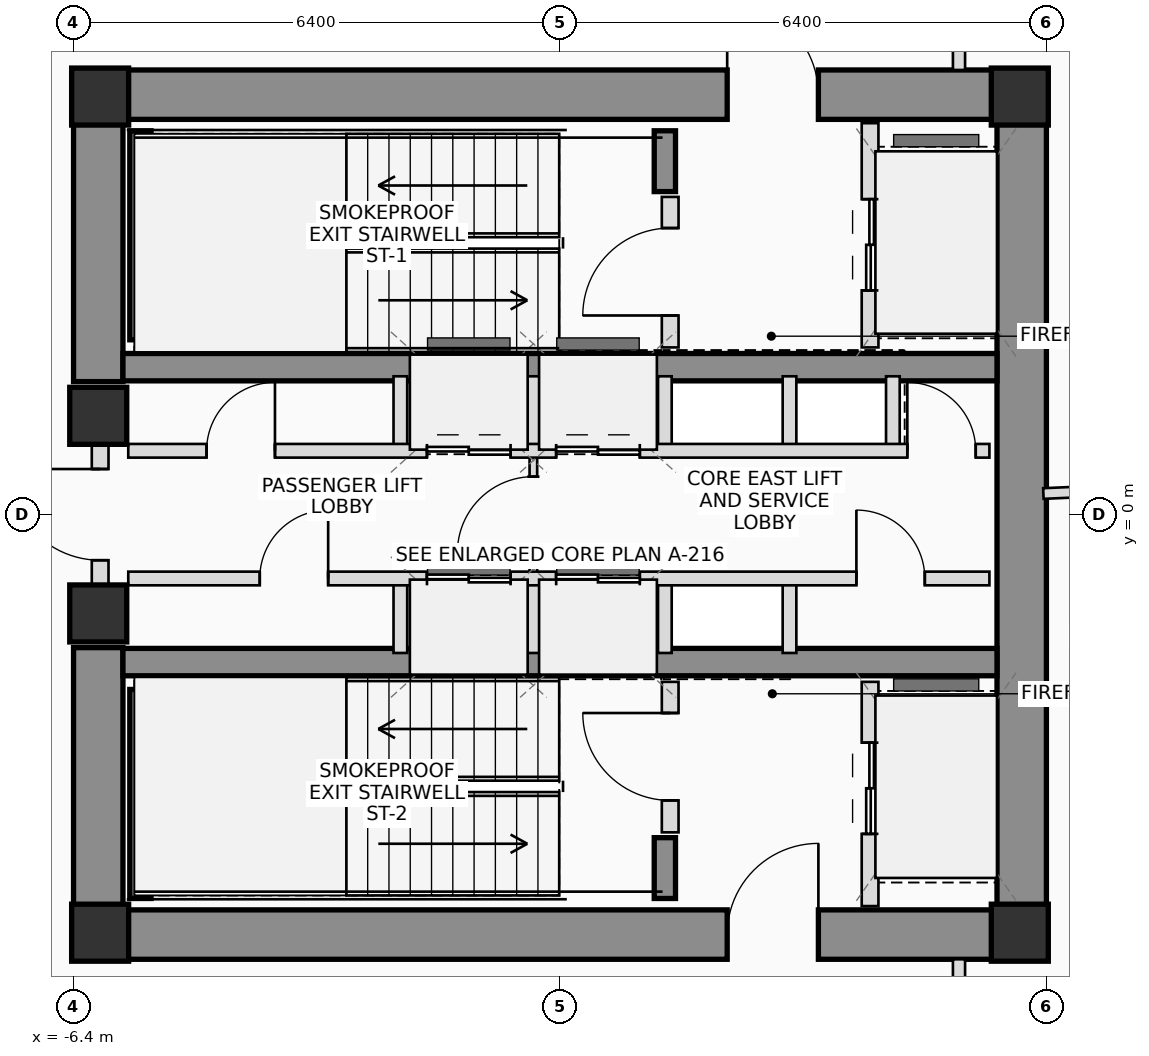
"""IFC4 building model, lengths in metres.
Left out: names, types, materials, properties, quantities, classifications, styles, units other than length and angle.
Written with IfcOpenShell. Run it as: python <this file> out.ifc"""

import sys

from ifc_helpers import new_model, si_unit, direction, frame, frame_2d, origin, origin_2d, place, context, subcontext, project, spatial, rectangle, extrude, source, transform, mapped, element, fill, save


model = new_model("IFC4")
c1 = context("Model", 3, precision=1e-05, world=origin(), true_north=direction((0.0, 1.0)))
c2 = subcontext(c1, "Body", "Model", "MODEL_VIEW")
j1 = project(units=[si_unit("LENGTHUNIT", "METRE"), si_unit("PLANEANGLEUNIT", "RADIAN")], contexts=[c1])
p1 = place(None, origin())
s1 = spatial("IfcSite", under=j1, at=p1, CompositionType="ELEMENT")
p2 = place(p1, origin())
s2 = spatial("IfcBuilding", under=s1, at=p2, CompositionType="ELEMENT")
p3 = place(p2, frame((0.0, 0.0, 179.45)))
s3 = spatial("IfcBuildingStorey", under=s2, at=p3, CompositionType="ELEMENT", Elevation=179.45)
m1 = source(origin(), c2, "Body", "SweptSolid", [
    extrude(rectangle(XDim=0.75, YDim=0.75, at=origin_2d()), origin(), (0.0, 0.0, 1.0), 3.45),
])
for number, where, z_axis, x_axis in (
    (1, (-6.05, -5.5, 0.0), (0.0, 0.0, 1.0), (1.0, 0.0, 0.0)),
    (2, (6.05, -5.5, 0.0), (0.0, 0.0, 1.0), (1.0, 0.0, 0.0)),
    (3, (6.05, 5.5, 0.0), (0.0, 0.0, 1.0), (1.0, 0.0, 0.0)),
    (4, (-6.05, 5.5, 0.0), (0.0, 0.0, 1.0), (1.0, 0.0, 0.0)),
):
    element("IfcColumn", number, at=place(p3, frame(where, z_axis=z_axis, x_axis=x_axis)), inside=s3, PredefinedType="COLUMN", context=c2, shape_type="MappedRepresentation", body=[
        mapped(m1, transform((0.0, 0.0, 0.0), scale=1.0)),
    ])
p4 = place(p3, frame((-6.4, 5.525, 0.0), z_axis=(0.0, 0.0, 1.0), x_axis=(1.0, 0.0, 0.0)))
e5 = element("IfcWall", 5, at=p4, inside=s3, PredefinedType="SHEAR", context=c2, shape_type="SweptSolid", body=[
    extrude(rectangle(XDim=12.8, YDim=0.65, at=frame_2d((6.4, 0.0))), origin(), (0.0, 0.0, 1.0), 3.45),
])
p5 = place(p4, frame((8.6, 0.0, 0.0)))
e6 = element("IfcOpeningElement", 6, at=p5, cuts=e5, PredefinedType="OPENING", context=c2, shape_type="SweptSolid", body=[
    extrude(rectangle(XDim=1.2, YDim=2.2, at=frame_2d((0.6, 1.1))), frame((0.0, 0.335, 0.0), z_axis=(0.0, -1.0, 0.0), x_axis=(1.0, 0.0, 0.0)), (0.0, 0.0, 1.0), 0.67),
])
p6 = place(p3, frame((-6.4, -5.525, 0.0), z_axis=(0.0, 0.0, 1.0), x_axis=(1.0, 0.0, 0.0)))
e7 = element("IfcWall", 7, at=p6, inside=s3, PredefinedType="SHEAR", context=c2, shape_type="SweptSolid", body=[
    extrude(rectangle(XDim=12.8, YDim=0.65, at=frame_2d((6.4, 0.0))), origin(), (0.0, 0.0, 1.0), 3.45),
])
p7 = place(p6, frame((8.6, 0.0, 0.0)))
e8 = element("IfcOpeningElement", 8, at=p7, cuts=e7, PredefinedType="OPENING", context=c2, shape_type="SweptSolid", body=[
    extrude(rectangle(XDim=1.2, YDim=2.2, at=frame_2d((0.6, 1.1))), frame((0.0, 0.335, 0.0), z_axis=(0.0, -1.0, 0.0), x_axis=(1.0, 0.0, 0.0)), (0.0, 0.0, 1.0), 0.67),
])
p8 = place(p3, frame((6.075, -5.2, 0.0), z_axis=(0.0, 0.0, 1.0), x_axis=(0.0, 1.0, 0.0)))
e9 = element("IfcWall", 9, at=p8, inside=s3, PredefinedType="SHEAR", context=c2, shape_type="SweptSolid", body=[
    extrude(rectangle(XDim=10.4, YDim=0.65, at=frame_2d((5.2, 0.0))), origin(), (0.0, 0.0, 1.0), 3.45),
])
for number, where, z_axis, x_axis in (
    (10, (-6.075, -5.2, 0.0), (0.0, 0.0, 1.0), (0.0, 1.0, 0.0)),
    (11, (-6.075, 1.75, 0.0), (0.0, 0.0, 1.0), (0.0, 1.0, 0.0)),
):
    element("IfcWall", number, at=place(p3, frame(where, z_axis=z_axis, x_axis=x_axis)), inside=s3, PredefinedType="SHEAR", context=c2, shape_type="SweptSolid", body=[
        extrude(rectangle(XDim=3.45, YDim=0.65, at=frame_2d((1.725, 0.0))), origin(), (0.0, 0.0, 1.0), 3.45),
    ])
for number, where, z_axis, x_axis in (
    (12, (-5.75, 1.94, 0.0), (0.0, 0.0, 1.0), (1.0, 0.0, 0.0)),
    (13, (-5.75, -1.94, 0.0), (0.0, 0.0, 1.0), (1.0, 0.0, 0.0)),
):
    element("IfcWall", number, at=place(p3, frame(where, z_axis=z_axis, x_axis=x_axis)), inside=s3, PredefinedType="SHEAR", context=c2, shape_type="SweptSolid", body=[
        extrude(rectangle(XDim=11.5, YDim=0.36, at=frame_2d((5.75, 0.0))), origin(), (0.0, 0.0, 1.0), 3.45),
    ])
p9 = place(p3, frame((-5.52, 2.3, 0.0), z_axis=(0.0, 0.0, 1.0), x_axis=(0.0, 1.0, 0.0)))
e14 = element("IfcWall", 14, at=p9, inside=s3, PredefinedType="SHEAR", context=c2, shape_type="SweptSolid", body=[
    extrude(rectangle(XDim=2.75, YDim=0.28, at=frame_2d((1.375, 0.0))), origin(), (0.0, 0.0, 1.0), 3.45),
])
p10 = place(p3, frame((1.38, 4.25, 0.0), z_axis=(0.0, 0.0, 1.0), x_axis=(0.0, 1.0, 0.0)))
e15 = element("IfcWall", 15, at=p10, inside=s3, PredefinedType="SHEAR", context=c2, shape_type="SweptSolid", body=[
    extrude(rectangle(XDim=0.8, YDim=0.28, at=frame_2d((0.4, 0.0))), origin(), (0.0, 0.0, 1.0), 3.45),
])
p11 = place(p3, frame((-5.52, -5.05, 0.0), z_axis=(0.0, 0.0, 1.0), x_axis=(0.0, 1.0, 0.0)))
e16 = element("IfcWall", 16, at=p11, inside=s3, PredefinedType="SHEAR", context=c2, shape_type="SweptSolid", body=[
    extrude(rectangle(XDim=2.75, YDim=0.28, at=frame_2d((1.375, 0.0))), origin(), (0.0, 0.0, 1.0), 3.45),
])
p12 = place(p3, frame((1.38, -5.05, 0.0), z_axis=(0.0, 0.0, 1.0), x_axis=(0.0, 1.0, 0.0)))
e17 = element("IfcWall", 17, at=p12, inside=s3, PredefinedType="SHEAR", context=c2, shape_type="SweptSolid", body=[
    extrude(rectangle(XDim=0.8, YDim=0.28, at=frame_2d((0.4, 0.0))), origin(), (0.0, 0.0, 1.0), 3.45),
])
for number, where, z_axis, x_axis in (
    (18, (-6.075, -1.3, 0.0), (0.0, 0.0, 1.0), (1.0, 0.0, 0.0)),
    (19, (-6.075, 1.3, 0.0), (0.0, 0.0, 1.0), (1.0, 0.0, 0.0)),
):
    element("IfcColumn", number, at=place(p3, frame(where, z_axis=z_axis, x_axis=x_axis)), inside=s3, PredefinedType="COLUMN", context=c2, shape_type="MappedRepresentation", body=[
        mapped(m1, transform((0.0, 0.0, 0.0), scale=1.0)),
    ])
p13 = place(p3, frame((-6.05, -0.95, 0.0), z_axis=(0.0, 0.0, 1.0), x_axis=(0.0, 1.0, 0.0)))
e20 = element("IfcWall", 20, at=p13, inside=s3, PredefinedType="PLUMBINGWALL", context=c2, shape_type="SweptSolid", body=[
    extrude(rectangle(XDim=1.9, YDim=0.22, at=frame_2d((0.95, 0.0))), origin(), (0.0, 0.0, 1.0), 2.23),
])
p14 = place(p13, frame((0.35, 0.0, 0.0)))
e21 = element("IfcOpeningElement", 21, at=p14, cuts=e20, PredefinedType="OPENING", context=c2, shape_type="SweptSolid", body=[
    extrude(rectangle(XDim=1.2, YDim=2.2, at=frame_2d((0.6, 1.1))), frame((0.0, 0.12, 0.0), z_axis=(0.0, -1.0, 0.0), x_axis=(1.0, 0.0, 0.0)), (0.0, 0.0, 1.0), 0.24),
])
p15 = place(p3, frame((1.45, 2.2, 0.0), z_axis=(0.0, 0.0, 1.0), x_axis=(0.0, 1.0, 0.0)))
e22 = element("IfcWall", 22, at=p15, inside=s3, PredefinedType="PLUMBINGWALL", context=c2, shape_type="SweptSolid", body=[
    extrude(rectangle(XDim=1.98, YDim=0.22, at=frame_2d((0.99, 0.0))), origin(), (0.0, 0.0, 1.0), 3.25),
])
p16 = place(p15, frame((0.42, 0.0, 0.0)))
e23 = element("IfcOpeningElement", 23, at=p16, cuts=e22, PredefinedType="OPENING", context=c2, shape_type="SweptSolid", body=[
    extrude(rectangle(XDim=1.15, YDim=2.15, at=frame_2d((0.575, 1.075))), frame((0.0, 0.12, 0.0), z_axis=(0.0, -1.0, 0.0), x_axis=(1.0, 0.0, 0.0)), (0.0, 0.0, 1.0), 0.24),
])
p17 = place(p3, frame((4.08, 2.2, 0.0), z_axis=(0.0, 0.0, 1.0), x_axis=(0.0, 1.0, 0.0)))
e24 = element("IfcWall", 24, at=p17, inside=s3, PredefinedType="PLUMBINGWALL", context=c2, shape_type="SweptSolid", body=[
    extrude(rectangle(XDim=2.95, YDim=0.22, at=frame_2d((1.475, 0.0))), origin(), (0.0, 0.0, 1.0), 3.25),
])
p18 = place(p17, frame((0.75, 0.0, 0.0)))
e25 = element("IfcOpeningElement", 25, at=p18, cuts=e24, PredefinedType="OPENING", context=c2, shape_type="SweptSolid", body=[
    extrude(rectangle(XDim=1.2, YDim=2.25, at=frame_2d((0.6, 1.125))), frame((0.0, 0.12, 0.0), z_axis=(0.0, -1.0, 0.0), x_axis=(1.0, 0.0, 0.0)), (0.0, 0.0, 1.0), 0.24),
])
p19 = place(p3, frame((1.45, -4.18, 0.0), z_axis=(0.0, 0.0, 1.0), x_axis=(0.0, 1.0, 0.0)))
e26 = element("IfcWall", 26, at=p19, inside=s3, PredefinedType="PLUMBINGWALL", context=c2, shape_type="SweptSolid", body=[
    extrude(rectangle(XDim=1.98, YDim=0.22, at=frame_2d((0.99, 0.0))), origin(), (0.0, 0.0, 1.0), 3.25),
])
p20 = place(p19, frame((0.42, 0.0, 0.0)))
e27 = element("IfcOpeningElement", 27, at=p20, cuts=e26, PredefinedType="OPENING", context=c2, shape_type="SweptSolid", body=[
    extrude(rectangle(XDim=1.15, YDim=2.15, at=frame_2d((0.575, 1.075))), frame((0.0, 0.12, 0.0), z_axis=(0.0, -1.0, 0.0), x_axis=(1.0, 0.0, 0.0)), (0.0, 0.0, 1.0), 0.24),
])
p21 = place(p3, frame((4.08, -5.15, 0.0), z_axis=(0.0, 0.0, 1.0), x_axis=(0.0, 1.0, 0.0)))
e28 = element("IfcWall", 28, at=p21, inside=s3, PredefinedType="PLUMBINGWALL", context=c2, shape_type="SweptSolid", body=[
    extrude(rectangle(XDim=2.95, YDim=0.22, at=frame_2d((1.475, 0.0))), origin(), (0.0, 0.0, 1.0), 3.25),
])
p22 = place(p21, frame((0.95, 0.0, 0.0)))
e29 = element("IfcOpeningElement", 29, at=p22, cuts=e28, PredefinedType="OPENING", context=c2, shape_type="SweptSolid", body=[
    extrude(rectangle(XDim=1.2, YDim=2.25, at=frame_2d((0.6, 1.125))), frame((0.0, 0.12, 0.0), z_axis=(0.0, -1.0, 0.0), x_axis=(1.0, 0.0, 0.0)), (0.0, 0.0, 1.0), 0.24),
])
p23 = place(p3, frame((-0.35, -0.84, 0.0), z_axis=(0.0, 0.0, 1.0), x_axis=(0.0, 1.0, 0.0)))
e30 = element("IfcWall", 30, at=p23, inside=s3, PredefinedType="PARTITIONING", context=c2, shape_type="SweptSolid", body=[
    extrude(rectangle(XDim=1.68, YDim=0.1, at=frame_2d((0.84, 0.0))), origin(), (0.0, 0.0, 1.0), 3.25),
])
p24 = place(p23, frame((0.34, 0.0, 0.0)))
e31 = element("IfcOpeningElement", 31, at=p24, cuts=e30, PredefinedType="OPENING", context=c2, shape_type="SweptSolid", body=[
    extrude(rectangle(XDim=1.0, YDim=2.25, at=frame_2d((0.5, 1.125))), frame((0.0, 0.06, 0.0), z_axis=(0.0, -1.0, 0.0), x_axis=(1.0, 0.0, 0.0)), (0.0, 0.0, 1.0), 0.12),
])
for number, where, z_axis, x_axis in (
    (32, (-2.1, 0.84, 0.0), (0.0, 0.0, 1.0), (0.0, 1.0, 0.0)),
    (33, (-2.1, -1.82, 0.0), (0.0, 0.0, 1.0), (0.0, 1.0, 0.0)),
    (34, (-0.35, 0.84, 0.0), (0.0, 0.0, 1.0), (0.0, 1.0, 0.0)),
    (35, (-0.35, -1.82, 0.0), (0.0, 0.0, 1.0), (0.0, 1.0, 0.0)),
    (36, (1.38, 0.84, 0.0), (0.0, 0.0, 1.0), (0.0, 1.0, 0.0)),
    (37, (1.38, -1.82, 0.0), (0.0, 0.0, 1.0), (0.0, 1.0, 0.0)),
    (38, (3.02, 0.84, 0.0), (0.0, 0.0, 1.0), (0.0, 1.0, 0.0)),
    (39, (4.38, 0.84, 0.0), (0.0, 0.0, 1.0), (0.0, 1.0, 0.0)),
    (40, (3.02, -1.82, 0.0), (0.0, 0.0, 1.0), (0.0, 1.0, 0.0)),
):
    element("IfcWall", number, at=place(p3, frame(where, z_axis=z_axis, x_axis=x_axis)), inside=s3, PredefinedType="PLUMBINGWALL", context=c2, shape_type="SweptSolid", body=[
        extrude(rectangle(XDim=0.98, YDim=0.18, at=frame_2d((0.49, 0.0))), origin(), (0.0, 0.0, 1.0), 3.25),
    ])
p25 = place(p3, frame((-5.68, 0.84, 0.0), z_axis=(0.0, 0.0, 1.0), x_axis=(1.0, 0.0, 0.0)))
e41 = element("IfcWall", 41, at=p25, inside=s3, PredefinedType="PLUMBINGWALL", context=c2, shape_type="SweptSolid", body=[
    extrude(rectangle(XDim=11.33, YDim=0.18, at=frame_2d((5.665, 0.0))), origin(), (0.0, 0.0, 1.0), 3.25),
])
p26 = place(p25, frame((1.03, 0.0, 0.0)))
e42 = element("IfcOpeningElement", 42, at=p26, cuts=e41, PredefinedType="OPENING", context=c2, shape_type="SweptSolid", body=[
    extrude(rectangle(XDim=0.9, YDim=2.05, at=frame_2d((0.45, 1.025))), frame((0.0, 0.1, 0.0), z_axis=(0.0, -1.0, 0.0), x_axis=(1.0, 0.0, 0.0)), (0.0, 0.0, 1.0), 0.2),
])
p27 = place(p25, frame((3.93, 0.0, 0.0)))
e43 = element("IfcOpeningElement", 43, at=p27, cuts=e41, PredefinedType="OPENING", context=c2, shape_type="SweptSolid", body=[
    extrude(rectangle(XDim=1.1, YDim=2.2, at=frame_2d((0.55, 1.1))), frame((0.0, 0.1, 0.0), z_axis=(0.0, -1.0, 0.0), x_axis=(1.0, 0.0, 0.0)), (0.0, 0.0, 1.0), 0.2),
])
p28 = place(p25, frame((5.63, 0.0, 0.0)))
e44 = element("IfcOpeningElement", 44, at=p28, cuts=e41, PredefinedType="OPENING", context=c2, shape_type="SweptSolid", body=[
    extrude(rectangle(XDim=1.1, YDim=2.2, at=frame_2d((0.55, 1.1))), frame((0.0, 0.1, 0.0), z_axis=(0.0, -1.0, 0.0), x_axis=(1.0, 0.0, 0.0)), (0.0, 0.0, 1.0), 0.2),
])
p29 = place(p25, frame((10.25, 0.0, 0.0)))
e45 = element("IfcOpeningElement", 45, at=p29, cuts=e41, PredefinedType="OPENING", context=c2, shape_type="SweptSolid", body=[
    extrude(rectangle(XDim=0.9, YDim=2.05, at=frame_2d((0.45, 1.025))), frame((0.0, 0.1, 0.0), z_axis=(0.0, -1.0, 0.0), x_axis=(1.0, 0.0, 0.0)), (0.0, 0.0, 1.0), 0.2),
])
p30 = place(p3, frame((-5.68, -0.84, 0.0), z_axis=(0.0, 0.0, 1.0), x_axis=(1.0, 0.0, 0.0)))
e46 = element("IfcWall", 46, at=p30, inside=s3, PredefinedType="PLUMBINGWALL", context=c2, shape_type="SweptSolid", body=[
    extrude(rectangle(XDim=11.33, YDim=0.18, at=frame_2d((5.665, 0.0))), origin(), (0.0, 0.0, 1.0), 3.25),
])
p31 = place(p30, frame((1.73, 0.0, 0.0)))
e47 = element("IfcOpeningElement", 47, at=p31, cuts=e46, PredefinedType="OPENING", context=c2, shape_type="SweptSolid", body=[
    extrude(rectangle(XDim=0.9, YDim=2.05, at=frame_2d((0.45, 1.025))), frame((0.0, 0.1, 0.0), z_axis=(0.0, -1.0, 0.0), x_axis=(1.0, 0.0, 0.0)), (0.0, 0.0, 1.0), 0.2),
])
p32 = place(p30, frame((3.93, 0.0, 0.0)))
e48 = element("IfcOpeningElement", 48, at=p32, cuts=e46, PredefinedType="OPENING", context=c2, shape_type="SweptSolid", body=[
    extrude(rectangle(XDim=1.1, YDim=2.2, at=frame_2d((0.55, 1.1))), frame((0.0, 0.1, 0.0), z_axis=(0.0, -1.0, 0.0), x_axis=(1.0, 0.0, 0.0)), (0.0, 0.0, 1.0), 0.2),
])
p33 = place(p30, frame((5.63, 0.0, 0.0)))
e49 = element("IfcOpeningElement", 49, at=p33, cuts=e46, PredefinedType="OPENING", context=c2, shape_type="SweptSolid", body=[
    extrude(rectangle(XDim=1.1, YDim=2.2, at=frame_2d((0.55, 1.1))), frame((0.0, 0.1, 0.0), z_axis=(0.0, -1.0, 0.0), x_axis=(1.0, 0.0, 0.0)), (0.0, 0.0, 1.0), 0.2),
])
p34 = place(p30, frame((9.58, 0.0, 0.0)))
e50 = element("IfcOpeningElement", 50, at=p34, cuts=e46, PredefinedType="OPENING", context=c2, shape_type="SweptSolid", body=[
    extrude(rectangle(XDim=0.9, YDim=2.05, at=frame_2d((0.45, 1.025))), frame((0.0, 0.1, 0.0), z_axis=(0.0, -1.0, 0.0), x_axis=(1.0, 0.0, 0.0)), (0.0, 0.0, 1.0), 0.2),
])
for number, where, z_axis, x_axis in (
    (51, (5.25, 7.6, 0.0), (0.0, 0.0, 1.0), (0.0, -1.0, 0.0)),
    (52, (5.25, -5.85, 0.0), (0.0, 0.0, 1.0), (0.0, -1.0, 0.0)),
):
    element("IfcWall", number, at=place(p3, frame(where, z_axis=z_axis, x_axis=x_axis)), inside=s3, PredefinedType="PARTITIONING", context=c2, shape_type="SweptSolid", body=[
        extrude(rectangle(XDim=1.75, YDim=0.16, at=frame_2d((0.875, 0.0))), origin(), (0.0, 0.0, 1.0), 3.25),
    ])
p35 = place(p3, frame((6.36, 0.278, 0.0), z_axis=(0.0, 0.0, 1.0), x_axis=(0.999047543566, 0.043634913719, 0.0)))
e53 = element("IfcWall", 53, at=p35, inside=s3, PredefinedType="PARTITIONING", context=c2, shape_type="SweptSolid", body=[
    extrude(rectangle(XDim=7.503, YDim=0.14, at=frame_2d((3.751, 0.0))), origin(), (0.0, 0.0, 1.0), 2.605),
])
p36 = place(p5, origin())
e54 = element("IfcDoor", 54, at=p36, inside=s3, OperationType="SINGLE_SWING_LEFT", PredefinedType="DOOR", context=c2, shape_type="SweptSolid", body=[
    extrude(rectangle(XDim=1.2, YDim=2.2, at=frame_2d((0.6, 1.1))), frame((0.0, 0.025, 0.0), z_axis=(0.0, -1.0, 0.0), x_axis=(1.0, 0.0, 0.0)), (0.0, 0.0, 1.0), 0.05),
])
fill(e6, e54)
p37 = place(p7, origin())
e55 = element("IfcDoor", 55, at=p37, inside=s3, OperationType="SINGLE_SWING_RIGHT", PredefinedType="DOOR", context=c2, shape_type="SweptSolid", body=[
    extrude(rectangle(XDim=1.2, YDim=2.2, at=frame_2d((0.6, 1.1))), frame((0.0, 0.025, 0.0), z_axis=(0.0, -1.0, 0.0), x_axis=(1.0, 0.0, 0.0)), (0.0, 0.0, 1.0), 0.05),
])
fill(e8, e55)
p38 = place(p14, origin())
e56 = element("IfcDoor", 56, at=p38, inside=s3, OperationType="SINGLE_SWING_RIGHT", PredefinedType="DOOR", context=c2, shape_type="SweptSolid", body=[
    extrude(rectangle(XDim=1.2, YDim=2.2, at=frame_2d((0.6, 1.1))), frame((0.0, 0.025, 0.0), z_axis=(0.0, -1.0, 0.0), x_axis=(1.0, 0.0, 0.0)), (0.0, 0.0, 1.0), 0.05),
])
fill(e21, e56)
p39 = place(p16, origin())
e57 = element("IfcDoor", 57, at=p39, inside=s3, OperationType="SINGLE_SWING_LEFT", PredefinedType="DOOR", context=c2, shape_type="SweptSolid", body=[
    extrude(rectangle(XDim=1.15, YDim=2.15, at=frame_2d((0.575, 1.075))), frame((0.0, 0.025, 0.0), z_axis=(0.0, -1.0, 0.0), x_axis=(1.0, 0.0, 0.0)), (0.0, 0.0, 1.0), 0.05),
])
fill(e23, e57)
p40 = place(p18, origin())
e58 = element("IfcDoor", 58, at=p40, inside=s3, OperationType="DOUBLE_DOOR_SLIDING", PredefinedType="DOOR", context=c2, shape_type="SweptSolid", body=[
    extrude(rectangle(XDim=1.2, YDim=2.25, at=frame_2d((0.6, 1.125))), frame((0.0, 0.025, 0.0), z_axis=(0.0, -1.0, 0.0), x_axis=(1.0, 0.0, 0.0)), (0.0, 0.0, 1.0), 0.05),
])
fill(e25, e58)
p41 = place(p20, origin())
e59 = element("IfcDoor", 59, at=p41, inside=s3, OperationType="SINGLE_SWING_RIGHT", PredefinedType="DOOR", context=c2, shape_type="SweptSolid", body=[
    extrude(rectangle(XDim=1.15, YDim=2.15, at=frame_2d((0.575, 1.075))), frame((0.0, 0.025, 0.0), z_axis=(0.0, -1.0, 0.0), x_axis=(1.0, 0.0, 0.0)), (0.0, 0.0, 1.0), 0.05),
])
fill(e27, e59)
p42 = place(p22, origin())
e60 = element("IfcDoor", 60, at=p42, inside=s3, OperationType="DOUBLE_DOOR_SLIDING", PredefinedType="DOOR", context=c2, shape_type="SweptSolid", body=[
    extrude(rectangle(XDim=1.2, YDim=2.25, at=frame_2d((0.6, 1.125))), frame((0.0, 0.025, 0.0), z_axis=(0.0, -1.0, 0.0), x_axis=(1.0, 0.0, 0.0)), (0.0, 0.0, 1.0), 0.05),
])
fill(e29, e60)
p43 = place(p24, origin())
e61 = element("IfcDoor", 61, at=p43, inside=s3, OperationType="SINGLE_SWING_LEFT", PredefinedType="DOOR", context=c2, shape_type="SweptSolid", body=[
    extrude(rectangle(XDim=1.0, YDim=2.25, at=frame_2d((0.5, 1.125))), frame((0.0, 0.025, 0.0), z_axis=(0.0, -1.0, 0.0), x_axis=(1.0, 0.0, 0.0)), (0.0, 0.0, 1.0), 0.05),
])
fill(e31, e61)
p44 = place(p26, origin())
e62 = element("IfcDoor", 62, at=p44, inside=s3, OperationType="SINGLE_SWING_RIGHT", PredefinedType="DOOR", context=c2, shape_type="SweptSolid", body=[
    extrude(rectangle(XDim=0.9, YDim=2.05, at=frame_2d((0.45, 1.025))), frame((0.0, 0.025, 0.0), z_axis=(0.0, -1.0, 0.0), x_axis=(1.0, 0.0, 0.0)), (0.0, 0.0, 1.0), 0.05),
])
fill(e42, e62)
p45 = place(p27, origin())
e63 = element("IfcDoor", 63, at=p45, inside=s3, OperationType="DOUBLE_DOOR_SLIDING", PredefinedType="DOOR", context=c2, shape_type="SweptSolid", body=[
    extrude(rectangle(XDim=1.1, YDim=2.2, at=frame_2d((0.55, 1.1))), frame((0.0, 0.025, 0.0), z_axis=(0.0, -1.0, 0.0), x_axis=(1.0, 0.0, 0.0)), (0.0, 0.0, 1.0), 0.05),
])
fill(e43, e63)
p46 = place(p28, origin())
e64 = element("IfcDoor", 64, at=p46, inside=s3, OperationType="DOUBLE_DOOR_SLIDING", PredefinedType="DOOR", context=c2, shape_type="SweptSolid", body=[
    extrude(rectangle(XDim=1.1, YDim=2.2, at=frame_2d((0.55, 1.1))), frame((0.0, 0.025, 0.0), z_axis=(0.0, -1.0, 0.0), x_axis=(1.0, 0.0, 0.0)), (0.0, 0.0, 1.0), 0.05),
])
fill(e44, e64)
p47 = place(p29, origin())
e65 = element("IfcDoor", 65, at=p47, inside=s3, OperationType="SINGLE_SWING_LEFT", PredefinedType="DOOR", context=c2, shape_type="SweptSolid", body=[
    extrude(rectangle(XDim=0.9, YDim=2.05, at=frame_2d((0.45, 1.025))), frame((0.0, 0.025, 0.0), z_axis=(0.0, -1.0, 0.0), x_axis=(1.0, 0.0, 0.0)), (0.0, 0.0, 1.0), 0.05),
])
fill(e45, e65)
p48 = place(p31, origin())
e66 = element("IfcDoor", 66, at=p48, inside=s3, OperationType="SINGLE_SWING_RIGHT", PredefinedType="DOOR", context=c2, shape_type="SweptSolid", body=[
    extrude(rectangle(XDim=0.9, YDim=2.05, at=frame_2d((0.45, 1.025))), frame((0.0, 0.025, 0.0), z_axis=(0.0, -1.0, 0.0), x_axis=(1.0, 0.0, 0.0)), (0.0, 0.0, 1.0), 0.05),
])
fill(e47, e66)
p49 = place(p32, origin())
e67 = element("IfcDoor", 67, at=p49, inside=s3, OperationType="DOUBLE_DOOR_SLIDING", PredefinedType="DOOR", context=c2, shape_type="SweptSolid", body=[
    extrude(rectangle(XDim=1.1, YDim=2.2, at=frame_2d((0.55, 1.1))), frame((0.0, 0.025, 0.0), z_axis=(0.0, -1.0, 0.0), x_axis=(1.0, 0.0, 0.0)), (0.0, 0.0, 1.0), 0.05),
])
fill(e48, e67)
p50 = place(p33, origin())
e68 = element("IfcDoor", 68, at=p50, inside=s3, OperationType="DOUBLE_DOOR_SLIDING", PredefinedType="DOOR", context=c2, shape_type="SweptSolid", body=[
    extrude(rectangle(XDim=1.1, YDim=2.2, at=frame_2d((0.55, 1.1))), frame((0.0, 0.025, 0.0), z_axis=(0.0, -1.0, 0.0), x_axis=(1.0, 0.0, 0.0)), (0.0, 0.0, 1.0), 0.05),
])
fill(e49, e68)
p51 = place(p34, origin())
e69 = element("IfcDoor", 69, at=p51, inside=s3, OperationType="SINGLE_SWING_LEFT", PredefinedType="DOOR", context=c2, shape_type="SweptSolid", body=[
    extrude(rectangle(XDim=0.9, YDim=2.05, at=frame_2d((0.45, 1.025))), frame((0.0, 0.025, 0.0), z_axis=(0.0, -1.0, 0.0), x_axis=(1.0, 0.0, 0.0)), (0.0, 0.0, 1.0), 0.05),
])
fill(e50, e69)
save(model, sys.argv[1])
